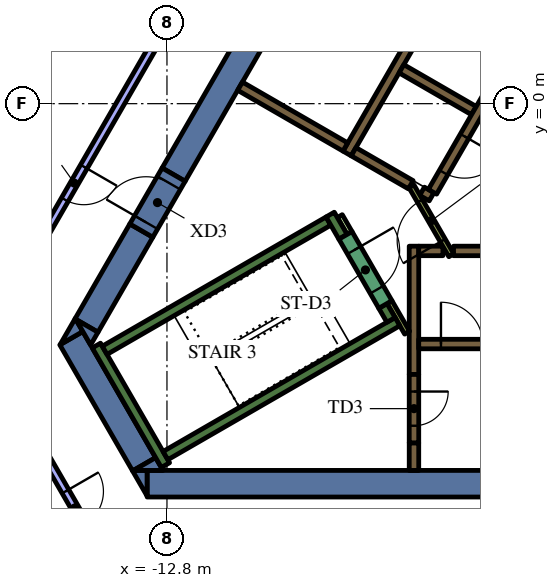
"""IFC4 building model, lengths in metres.
Left out: names, types, materials, properties, quantities, classifications, styles, units other than length and angle.
Written with IfcOpenShell. Run it as: python <this file> out.ifc"""

import sys

from ifc_helpers import new_model, si_unit, direction, frame, frame_2d, origin, place, context, subcontext, project, spatial, polyline, rectangle, outline, extrude, element, fill, save


model = new_model("IFC4")
c1 = context("Model", 3, precision=1e-05, world=origin(), true_north=direction((0.0, 1.0)))
c2 = subcontext(c1, "Body", "Model", "MODEL_VIEW")
j1 = project(units=[si_unit("LENGTHUNIT", "METRE"), si_unit("PLANEANGLEUNIT", "RADIAN")], contexts=[c1])
p1 = place(None, origin())
s1 = spatial("IfcSite", under=j1, at=p1, CompositionType="ELEMENT")
p2 = place(p1, origin())
s2 = spatial("IfcBuilding", under=s1, at=p2, CompositionType="ELEMENT")
p3 = place(p2, frame((0.0, 0.0, 201.6)))
s3 = spatial("IfcBuildingStorey", under=s2, at=p3, CompositionType="ELEMENT", Elevation=201.6)
p4 = place(p3, frame((8.904, -10.0, 0.0), z_axis=(0.0, 0.0, 1.0), x_axis=(-1.0, 0.0, 0.0)))
e1 = element("IfcWall", 1, at=p4, inside=s3, PredefinedType="SOLIDWALL", context=c2, shape_type="SweptSolid", body=[
    extrude(rectangle(XDim=22.226, YDim=0.7, at=frame_2d((11.113, 0.0))), origin(), (0.0, 0.0, 1.0), 4.2),
])
p5 = place(p3, origin())
e2 = element("IfcWall", 2, at=p5, inside=s3, PredefinedType="SOLIDWALL", context=c2, shape_type="SweptSolid", body=[
    extrude(outline(polyline([(-13.712, -9.65), (-13.324, -9.65), (-13.324, -10.322), (-13.712, -9.65)])), origin(), (0.0, 0.0, 1.0), 4.2),
])
p6 = place(p3, frame((-13.402, -9.487, 0.0), z_axis=(0.0, 0.0, 1.0), x_axis=(-0.500020498207, 0.866013568815, 0.0)))
e3 = element("IfcWall", 3, at=p6, inside=s3, PredefinedType="SOLIDWALL", context=c2, shape_type="SweptSolid", body=[
    extrude(rectangle(XDim=3.829, YDim=0.7, at=frame_2d((1.915, 0.0))), origin(), (0.0, 0.0, 1.0), 4.2),
])
e4 = element("IfcWall", 4, at=p5, inside=s3, PredefinedType="SOLIDWALL", context=c2, shape_type="SweptSolid", body=[
    extrude(outline(polyline([(-15.014, -5.995), (-15.611, -6.339), (-15.213, -5.65), (-15.014, -5.995)])), origin(), (0.0, 0.0, 1.0), 4.2),
])
e5 = element("IfcWall", 5, at=p5, inside=s3, PredefinedType="SOLIDWALL", context=c2, shape_type="SweptSolid", body=[
    extrude(outline(polyline([(-12.904, -9.65), (-13.68, -9.65), (-13.098, -9.314), (-12.904, -9.65)])), origin(), (0.0, 0.0, 1.0), 4.2),
])
p7 = place(p3, frame((-13.475, -3.339, 0.0), z_axis=(0.0, 0.0, 1.0), x_axis=(-0.500008214683, -0.866020660983, 0.0)))
e6 = element("IfcWall", 6, at=p7, inside=s3, PredefinedType="SOLIDWALL", context=c2, shape_type="SweptSolid", body=[
    extrude(rectangle(XDim=2.884, YDim=0.7, at=frame_2d((1.442, 0.0))), origin(), (0.0, 0.0, 1.0), 4.2),
])
e7 = element("IfcWall", 7, at=p5, inside=s3, PredefinedType="SOLIDWALL", context=c2, shape_type="SweptSolid", body=[
    extrude(outline(polyline([(-14.809, -6.35), (-15.197, -5.678), (-14.615, -6.014), (-14.809, -6.35)])), origin(), (0.0, 0.0, 1.0), 4.2),
])
p8 = place(p3, frame((-12.625, -1.867, 0.0), z_axis=(0.0, 0.0, 1.0), x_axis=(0.499998841866, 0.866026072432, 0.0)))
e8 = element("IfcWall", 8, at=p8, inside=s3, PredefinedType="SOLIDWALL", context=c2, shape_type="SweptSolid", body=[
    extrude(rectangle(XDim=16.694, YDim=0.7, at=frame_2d((8.347, 0.0))), origin(), (0.0, 0.0, 1.0), 4.2),
])
p9 = place(p3, frame((-12.84, -9.511, 0.0), z_axis=(0.0, 0.0, 1.0), x_axis=(-0.499997733992, 0.866026712061, 0.0)))
e9 = element("IfcWall", 9, at=p9, inside=s3, PredefinedType="SOLIDWALL", context=c2, shape_type="SweptSolid", body=[
    extrude(rectangle(XDim=3.634, YDim=0.25, at=frame_2d((1.817, 0.0))), origin(), (0.0, 0.0, 1.0), 4.2),
])
p10 = place(p3, frame((-14.44, -6.49, 0.0), z_axis=(0.0, 0.0, 1.0), x_axis=(0.866022966069, 0.500004222222, 0.0)))
e10 = element("IfcWall", 10, at=p10, inside=s3, PredefinedType="SOLIDWALL", context=c2, shape_type="SweptSolid", body=[
    extrude(rectangle(XDim=6.8, YDim=0.25, at=frame_2d((3.4, 0.0))), origin(), (0.0, 0.0, 1.0), 4.2),
])
p11 = place(p3, frame((-8.168, -3.503, 0.0), z_axis=(0.0, 0.0, 1.0), x_axis=(-0.499952099219, 0.866053057547, 0.0)))
e11 = element("IfcWall", 11, at=p11, inside=s3, PredefinedType="SOLIDWALL", context=c2, shape_type="SweptSolid", body=[
    extrude(rectangle(XDim=0.675, YDim=0.25, at=frame_2d((0.337, 0.0))), origin(), (0.0, 0.0, 1.0), 4.2),
])
p12 = place(p3, frame((-12.84, -9.261, 0.0), z_axis=(0.0, 0.0, 1.0), x_axis=(0.866016039709, 0.500016218704, 0.0)))
e12 = element("IfcWall", 12, at=p12, inside=s3, PredefinedType="SOLIDWALL", context=c2, shape_type="SweptSolid", body=[
    extrude(rectangle(XDim=7.05, YDim=0.25, at=frame_2d((3.525, 0.0))), origin(), (0.0, 0.0, 1.0), 4.2),
])
p13 = place(p3, frame((-6.905, -5.69, 0.0), z_axis=(0.0, 0.0, 1.0), x_axis=(-0.500402024738, 0.865793170242, 0.0)))
e13 = element("IfcWall", 13, at=p13, inside=s3, PredefinedType="SOLIDWALL", context=c2, shape_type="SweptSolid", body=[
    extrude(rectangle(XDim=0.425, YDim=0.25, at=frame_2d((0.212, 0.0))), origin(), (0.0, 0.0, 1.0), 4.2),
])
p14 = place(p3, frame((-6.3, -8.925, 0.0), z_axis=(0.0, 0.0, 1.0), x_axis=(0.0, -1.0, 0.0)))
e14 = element("IfcWall", 14, at=p14, inside=s3, PredefinedType="SOLIDWALL", context=c2, shape_type="SweptSolid", body=[
    extrude(rectangle(XDim=0.725, YDim=0.25, at=frame_2d((0.363, 0.0))), origin(), (0.0, 0.0, 1.0), 4.2),
])
p15 = place(p3, frame((-5.259, -3.875, 0.0), z_axis=(0.0, 0.0, 1.0), x_axis=(1.0, 0.0, 0.0)))
e15 = element("IfcWall", 15, at=p15, inside=s3, PredefinedType="SOLIDWALL", context=c2, shape_type="SweptSolid", body=[
    extrude(rectangle(XDim=10.489, YDim=0.25, at=frame_2d((5.244, 0.0))), origin(), (0.0, 0.0, 1.0), 4.2),
])
p16 = place(p3, frame((-6.3, -7.125, 0.0), z_axis=(0.0, 0.0, 1.0), x_axis=(0.0, 1.0, 0.0)))
e16 = element("IfcWall", 16, at=p16, inside=s3, PredefinedType="SOLIDWALL", context=c2, shape_type="SweptSolid", body=[
    extrude(rectangle(XDim=3.375, YDim=0.25, at=frame_2d((1.687, 0.0))), origin(), (0.0, 0.0, 1.0), 4.2),
])
p17 = place(p3, frame((-6.175, -3.875, 0.0), z_axis=(0.0, 0.0, 1.0), x_axis=(1.0, 0.0, 0.0)))
e17 = element("IfcWall", 17, at=p17, inside=s3, PredefinedType="SOLIDWALL", context=c2, shape_type="SweptSolid", body=[
    extrude(rectangle(XDim=0.637, YDim=0.25, at=frame_2d((0.318, 0.0))), origin(), (0.0, 0.0, 1.0), 4.2),
])
p18 = place(p3, frame((-3.02, 7.419, 0.0), z_axis=(0.0, 0.0, 1.0), x_axis=(-0.500022956343, -0.866012149528, 0.0)))
e18 = element("IfcWall", 18, at=p18, inside=s3, PredefinedType="SOLIDWALL", context=c2, shape_type="SweptSolid", body=[
    extrude(rectangle(XDim=10.08, YDim=0.25, at=frame_2d((5.04, 0.0))), origin(), (0.0, 0.0, 1.0), 4.2),
])
p19 = place(p3, frame((-4.724, -0.182, 0.0), z_axis=(0.0, 0.0, 1.0), x_axis=(-0.866008176907, 0.50002983664, 0.0)))
e19 = element("IfcWall", 19, at=p19, inside=s3, PredefinedType="SOLIDWALL", context=c2, shape_type="SweptSolid", body=[
    extrude(rectangle(XDim=2.2, YDim=0.25, at=frame_2d((1.1, 0.0))), origin(), (0.0, 0.0, 1.0), 4.2),
])
p20 = place(p3, frame((-6.088, -2.305, 0.0), z_axis=(0.0, 0.0, 1.0), x_axis=(0.866059450854, -0.499941024108, 0.0)))
e20 = element("IfcWall", 20, at=p20, inside=s3, PredefinedType="SOLIDWALL", context=c2, shape_type="SweptSolid", body=[
    extrude(rectangle(XDim=0.29, YDim=0.25, at=frame_2d((0.145, 0.0))), origin(), (0.0, 0.0, 1.0), 4.2),
])
p21 = place(p3, frame((-7.889, -1.265, 0.0), z_axis=(0.0, 0.0, 1.0), x_axis=(0.865986741702, -0.500066958712, 0.0)))
e21 = element("IfcWall", 21, at=p21, inside=s3, PredefinedType="SOLIDWALL", context=c2, shape_type="SweptSolid", body=[
    extrude(rectangle(XDim=1.738, YDim=0.25, at=frame_2d((0.869, 0.0))), origin(), (0.0, 0.0, 1.0), 4.2),
])
p22 = place(p3, frame((-8.106, -1.14, 0.0), z_axis=(0.0, 0.0, 1.0), x_axis=(-0.866008981251, 0.500028443584, 0.0)))
e22 = element("IfcWall", 22, at=p22, inside=s3, PredefinedType="SOLIDWALL", context=c2, shape_type="SweptSolid", body=[
    extrude(rectangle(XDim=3.2, YDim=0.25, at=frame_2d((1.6, 0.0))), origin(), (0.0, 0.0, 1.0), 4.2),
])
p23 = place(p3, frame((-8.252, -2.958, 0.0), z_axis=(0.0, 0.0, 1.0), x_axis=(0.500174715838, -0.865924508047, 0.0)))
e23 = element("IfcWall", 23, at=p23, inside=s3, PredefinedType="PARTITIONING", context=c2, shape_type="SweptSolid", body=[
    extrude(rectangle(XDim=0.514, YDim=0.15, at=frame_2d((0.257, 0.0))), origin(), (0.0, 0.0, 1.0), 3.45),
])
p24 = place(p3, frame((-6.48, -6.027, 0.0), z_axis=(0.0, 0.0, 1.0), x_axis=(-0.499927229454, 0.866067413802, 0.0)))
e24 = element("IfcWall", 24, at=p24, inside=s3, PredefinedType="PARTITIONING", context=c2, shape_type="SweptSolid", body=[
    extrude(rectangle(XDim=0.929, YDim=0.15, at=frame_2d((0.464, 0.0))), origin(), (0.0, 0.0, 1.0), 4.2),
])
p25 = place(p3, frame((-6.175, -6.325, 0.0), z_axis=(0.0, 0.0, 1.0), x_axis=(1.0, 0.0, 0.0)))
e25 = element("IfcWall", 25, at=p25, inside=s3, PredefinedType="SOLIDWALL", context=c2, shape_type="SweptSolid", body=[
    extrude(rectangle(XDim=12.35, YDim=0.25, at=frame_2d((6.175, 0.0))), origin(), (0.0, 0.0, 1.0), 4.2),
])
p26 = place(p25, frame((0.585, 0.0, 0.0)))
e26 = element("IfcOpeningElement", 26, at=p26, cuts=e25, PredefinedType="OPENING", context=c2, shape_type="SweptSolid", body=[
    extrude(rectangle(XDim=1.1, YDim=2.1, at=frame_2d((0.55, 1.05))), frame((0.0, 0.135, 0.0), z_axis=(0.0, -1.0, 0.0), x_axis=(1.0, 0.0, 0.0)), (0.0, 0.0, 1.0), 0.27),
])
p27 = place(p25, frame((3.105, 0.0, 0.0)))
e27 = element("IfcOpeningElement", 27, at=p27, cuts=e25, PredefinedType="OPENING", context=c2, shape_type="SweptSolid", body=[
    extrude(rectangle(XDim=1.1, YDim=2.1, at=frame_2d((0.55, 1.05))), frame((0.0, 0.135, 0.0), z_axis=(0.0, -1.0, 0.0), x_axis=(1.0, 0.0, 0.0)), (0.0, 0.0, 1.0), 0.27),
])
p28 = place(p25, frame((5.625, 0.0, 0.0)))
e28 = element("IfcOpeningElement", 28, at=p28, cuts=e25, PredefinedType="OPENING", context=c2, shape_type="SweptSolid", body=[
    extrude(rectangle(XDim=1.1, YDim=2.1, at=frame_2d((0.55, 1.05))), frame((0.0, 0.135, 0.0), z_axis=(0.0, -1.0, 0.0), x_axis=(1.0, 0.0, 0.0)), (0.0, 0.0, 1.0), 0.27),
])
p29 = place(p25, frame((8.145, 0.0, 0.0)))
e29 = element("IfcOpeningElement", 29, at=p29, cuts=e25, PredefinedType="OPENING", context=c2, shape_type="SweptSolid", body=[
    extrude(rectangle(XDim=1.1, YDim=2.1, at=frame_2d((0.55, 1.05))), frame((0.0, 0.135, 0.0), z_axis=(0.0, -1.0, 0.0), x_axis=(1.0, 0.0, 0.0)), (0.0, 0.0, 1.0), 0.27),
])
p30 = place(p25, frame((10.665, 0.0, 0.0)))
e30 = element("IfcOpeningElement", 30, at=p30, cuts=e25, PredefinedType="OPENING", context=c2, shape_type="SweptSolid", body=[
    extrude(rectangle(XDim=1.1, YDim=2.1, at=frame_2d((0.55, 1.05))), frame((0.0, 0.135, 0.0), z_axis=(0.0, -1.0, 0.0), x_axis=(1.0, 0.0, 0.0)), (0.0, 0.0, 1.0), 0.27),
])
p31 = place(p3, frame((-0.898, 6.194, 0.0), z_axis=(0.0, 0.0, 1.0), x_axis=(-0.499996202215, -0.866027596426, 0.0)))
e31 = element("IfcWall", 31, at=p31, inside=s3, PredefinedType="SOLIDWALL", context=c2, shape_type="SweptSolid", body=[
    extrude(rectangle(XDim=9.83, YDim=0.25, at=frame_2d((4.915, 0.0))), origin(), (0.0, 0.0, 1.0), 4.2),
])
p32 = place(p31, frame((0.585, 0.0, 0.0)))
e32 = element("IfcOpeningElement", 32, at=p32, cuts=e31, PredefinedType="OPENING", context=c2, shape_type="SweptSolid", body=[
    extrude(rectangle(XDim=1.1, YDim=2.1, at=frame_2d((0.55, 1.05))), frame((0.0, 0.135, 0.0), z_axis=(0.0, -1.0, 0.0), x_axis=(1.0, 0.0, 0.0)), (0.0, 0.0, 1.0), 0.27),
])
p33 = place(p31, frame((3.105, 0.0, 0.0)))
e33 = element("IfcOpeningElement", 33, at=p33, cuts=e31, PredefinedType="OPENING", context=c2, shape_type="SweptSolid", body=[
    extrude(rectangle(XDim=1.1, YDim=2.1, at=frame_2d((0.55, 1.05))), frame((0.0, 0.135, 0.0), z_axis=(0.0, -1.0, 0.0), x_axis=(1.0, 0.0, 0.0)), (0.0, 0.0, 1.0), 0.27),
])
p34 = place(p31, frame((5.625, 0.0, 0.0)))
e34 = element("IfcOpeningElement", 34, at=p34, cuts=e31, PredefinedType="OPENING", context=c2, shape_type="SweptSolid", body=[
    extrude(rectangle(XDim=1.1, YDim=2.1, at=frame_2d((0.55, 1.05))), frame((0.0, 0.135, 0.0), z_axis=(0.0, -1.0, 0.0), x_axis=(1.0, 0.0, 0.0)), (0.0, 0.0, 1.0), 0.27),
])
p35 = place(p31, frame((8.145, 0.0, 0.0)))
e35 = element("IfcOpeningElement", 35, at=p35, cuts=e31, PredefinedType="OPENING", context=c2, shape_type="SweptSolid", body=[
    extrude(rectangle(XDim=1.1, YDim=2.1, at=frame_2d((0.55, 1.05))), frame((0.0, 0.135, 0.0), z_axis=(0.0, -1.0, 0.0), x_axis=(1.0, 0.0, 0.0)), (0.0, 0.0, 1.0), 0.27),
])
p36 = place(p3, frame((-8.103, -3.466, 0.0), z_axis=(0.0, 0.0, 1.0), x_axis=(0.500078061341, -0.865980330357, 0.0)))
e36 = element("IfcWall", 36, at=p36, inside=s3, PredefinedType="SOLIDWALL", context=c2, shape_type="SweptSolid", body=[
    extrude(rectangle(XDim=2.1, YDim=0.4, at=frame_2d((1.05, 0.0))), origin(), (0.0, 0.0, 1.0), 4.2),
])
p37 = place(p36, frame((0.45, 0.0, 0.0)))
e37 = element("IfcOpeningElement", 37, at=p37, cuts=e36, PredefinedType="OPENING", context=c2, shape_type="SweptSolid", body=[
    extrude(rectangle(XDim=1.2, YDim=2.1, at=frame_2d((0.6, 1.05))), frame((0.0, 0.21, 0.0), z_axis=(0.0, -1.0, 0.0), x_axis=(1.0, 0.0, 0.0)), (0.0, 0.0, 1.0), 0.42),
])
p38 = place(p3, frame((-6.3, -7.125, 0.0), z_axis=(0.0, 0.0, 1.0), x_axis=(0.0, -1.0, 0.0)))
e38 = element("IfcWall", 38, at=p38, inside=s3, PredefinedType="SOLIDWALL", context=c2, shape_type="SweptSolid", body=[
    extrude(rectangle(XDim=1.8, YDim=0.25, at=frame_2d((0.9, 0.0))), origin(), (0.0, 0.0, 1.0), 4.2),
])
p39 = place(p38, frame((0.45, 0.0, 0.0)))
e39 = element("IfcOpeningElement", 39, at=p39, cuts=e38, PredefinedType="OPENING", context=c2, shape_type="SweptSolid", body=[
    extrude(rectangle(XDim=0.9, YDim=2.1, at=frame_2d((0.45, 1.05))), frame((0.0, 0.135, 0.0), z_axis=(0.0, -1.0, 0.0), x_axis=(1.0, 0.0, 0.0)), (0.0, 0.0, 1.0), 0.27),
])
p40 = place(p3, frame((-5.317, -3.99, 0.0), z_axis=(0.0, 0.0, 1.0), x_axis=(-0.500027713859, 0.866009402589, 0.0)))
e40 = element("IfcWall", 40, at=p40, inside=s3, PredefinedType="PARTITIONING", context=c2, shape_type="SweptSolid", body=[
    extrude(rectangle(XDim=2.1, YDim=0.15, at=frame_2d((1.05, 0.0))), origin(), (0.0, 0.0, 1.0), 4.2),
])
p41 = place(p40, frame((0.45, 0.0, 0.0)))
e41 = element("IfcOpeningElement", 41, at=p41, cuts=e40, PredefinedType="OPENING", context=c2, shape_type="SweptSolid", body=[
    extrude(rectangle(XDim=1.2, YDim=2.1, at=frame_2d((0.6, 1.05))), frame((0.0, 0.085, 0.0), z_axis=(0.0, -1.0, 0.0), x_axis=(1.0, 0.0, 0.0)), (0.0, 0.0, 1.0), 0.17),
])
p42 = place(p3, frame((-13.475, -3.339, 0.0), z_axis=(0.0, 0.0, 1.0), x_axis=(0.499954529098, 0.86605165483, 0.0)))
e42 = element("IfcWall", 42, at=p42, inside=s3, PredefinedType="SOLIDWALL", context=c2, shape_type="SweptSolid", body=[
    extrude(rectangle(XDim=1.7, YDim=0.7, at=frame_2d((0.85, 0.0))), origin(), (0.0, 0.0, 1.0), 4.2),
])
p43 = place(p42, frame((0.25, 0.0, 0.0)))
e43 = element("IfcOpeningElement", 43, at=p43, cuts=e42, PredefinedType="OPENING", context=c2, shape_type="SweptSolid", body=[
    extrude(rectangle(XDim=1.2, YDim=2.1, at=frame_2d((0.6, 1.05))), frame((0.0, 0.36, 0.0), z_axis=(0.0, -1.0, 0.0), x_axis=(1.0, 0.0, 0.0)), (0.0, 0.0, 1.0), 0.72),
])
p44 = place(p3, frame((-12.787, 2.152, 0.0), z_axis=(0.0, 0.0, 1.0), x_axis=(-0.50000660679, -0.866021589319, 0.0)))
e44 = element("IfcWall", 44, at=p44, inside=s3, PredefinedType="PARTITIONING", context=c2, shape_type="SweptSolid", body=[
    extrude(rectangle(XDim=9.817, YDim=0.2, at=frame_2d((4.909, 0.0))), origin(), (0.0, 0.0, 1.0), 3.45),
])
p45 = place(p44, frame((4.4, 0.0, 0.0)))
e45 = element("IfcOpeningElement", 45, at=p45, cuts=e44, PredefinedType="OPENING", context=c2, shape_type="SweptSolid", body=[
    extrude(rectangle(XDim=1.0, YDim=2.1, at=frame_2d((0.5, 1.05))), frame((0.0, 0.11, 0.0), z_axis=(0.0, -1.0, 0.0), x_axis=(1.0, 0.0, 0.0)), (0.0, 0.0, 1.0), 0.22),
])
p46 = place(p3, frame((-15.971, -9.337, 0.0), z_axis=(0.0, 0.0, 1.0), x_axis=(0.500007233661, -0.866021227388, 0.0)))
e46 = element("IfcWall", 46, at=p46, inside=s3, PredefinedType="PARTITIONING", context=c2, shape_type="SweptSolid", body=[
    extrude(rectangle(XDim=2.919, YDim=0.2, at=frame_2d((1.459, 0.0))), origin(), (0.0, 0.0, 1.0), 3.45),
])
p47 = place(p46, frame((1.0, 0.0, 0.0)))
e47 = element("IfcOpeningElement", 47, at=p47, cuts=e46, PredefinedType="OPENING", context=c2, shape_type="SweptSolid", body=[
    extrude(rectangle(XDim=1.0, YDim=2.1, at=frame_2d((0.5, 1.05))), frame((0.0, 0.11, 0.0), z_axis=(0.0, -1.0, 0.0), x_axis=(1.0, 0.0, 0.0)), (0.0, 0.0, 1.0), 0.22),
])
p48 = place(p26, origin())
e48 = element("IfcDoor", 48, at=p48, inside=s3, OperationType="DOUBLE_DOOR_SLIDING", PredefinedType="DOOR", context=c2, shape_type="SweptSolid", body=[
    extrude(rectangle(XDim=1.1, YDim=2.1, at=frame_2d((0.55, 1.05))), frame((0.0, 0.025, 0.0), z_axis=(0.0, -1.0, 0.0), x_axis=(1.0, 0.0, 0.0)), (0.0, 0.0, 1.0), 0.05),
])
fill(e26, e48)
p49 = place(p35, origin())
e49 = element("IfcDoor", 49, at=p49, inside=s3, OperationType="DOUBLE_DOOR_SLIDING", PredefinedType="DOOR", context=c2, shape_type="SweptSolid", body=[
    extrude(rectangle(XDim=1.1, YDim=2.1, at=frame_2d((0.55, 1.05))), frame((0.0, 0.025, 0.0), z_axis=(0.0, -1.0, 0.0), x_axis=(1.0, 0.0, 0.0)), (0.0, 0.0, 1.0), 0.05),
])
fill(e35, e49)
p50 = place(p37, origin())
e50 = element("IfcDoor", 50, at=p50, inside=s3, OperationType="SINGLE_SWING_LEFT", PredefinedType="DOOR", context=c2, shape_type="SweptSolid", body=[
    extrude(rectangle(XDim=1.2, YDim=2.1, at=frame_2d((0.6, 1.05))), frame((0.0, 0.025, 0.0), z_axis=(0.0, -1.0, 0.0), x_axis=(1.0, 0.0, 0.0)), (0.0, 0.0, 1.0), 0.05),
])
fill(e37, e50)
p51 = place(p39, origin())
e51 = element("IfcDoor", 51, at=p51, inside=s3, OperationType="SINGLE_SWING_LEFT", PredefinedType="DOOR", context=c2, shape_type="SweptSolid", body=[
    extrude(rectangle(XDim=0.9, YDim=2.1, at=frame_2d((0.45, 1.05))), frame((0.0, 0.025, 0.0), z_axis=(0.0, -1.0, 0.0), x_axis=(1.0, 0.0, 0.0)), (0.0, 0.0, 1.0), 0.05),
])
fill(e39, e51)
p52 = place(p41, origin())
e52 = element("IfcDoor", 52, at=p52, inside=s3, OperationType="SINGLE_SWING_LEFT", PredefinedType="DOOR", context=c2, shape_type="SweptSolid", body=[
    extrude(rectangle(XDim=1.2, YDim=2.1, at=frame_2d((0.6, 1.05))), frame((0.0, 0.025, 0.0), z_axis=(0.0, -1.0, 0.0), x_axis=(1.0, 0.0, 0.0)), (0.0, 0.0, 1.0), 0.05),
])
fill(e41, e52)
p53 = place(p43, origin())
e53 = element("IfcDoor", 53, at=p53, inside=s3, OperationType="SINGLE_SWING_LEFT", PredefinedType="DOOR", context=c2, shape_type="SweptSolid", body=[
    extrude(rectangle(XDim=1.2, YDim=2.1, at=frame_2d((0.6, 1.05))), frame((0.0, 0.025, 0.0), z_axis=(0.0, -1.0, 0.0), x_axis=(1.0, 0.0, 0.0)), (0.0, 0.0, 1.0), 0.05),
])
fill(e43, e53)
p54 = place(p45, origin())
e54 = element("IfcDoor", 54, at=p54, inside=s3, OperationType="SINGLE_SWING_LEFT", PredefinedType="DOOR", context=c2, shape_type="SweptSolid", body=[
    extrude(rectangle(XDim=1.0, YDim=2.1, at=frame_2d((0.5, 1.05))), frame((0.0, 0.025, 0.0), z_axis=(0.0, -1.0, 0.0), x_axis=(1.0, 0.0, 0.0)), (0.0, 0.0, 1.0), 0.05),
])
fill(e45, e54)
p55 = place(p47, origin())
e55 = element("IfcDoor", 55, at=p55, inside=s3, OperationType="SINGLE_SWING_RIGHT", PredefinedType="DOOR", context=c2, shape_type="SweptSolid", body=[
    extrude(rectangle(XDim=1.0, YDim=2.1, at=frame_2d((0.5, 1.05))), frame((0.0, 0.025, 0.0), z_axis=(0.0, -1.0, 0.0), x_axis=(1.0, 0.0, 0.0)), (0.0, 0.0, 1.0), 0.05),
])
fill(e47, e55)
save(model, sys.argv[1])
